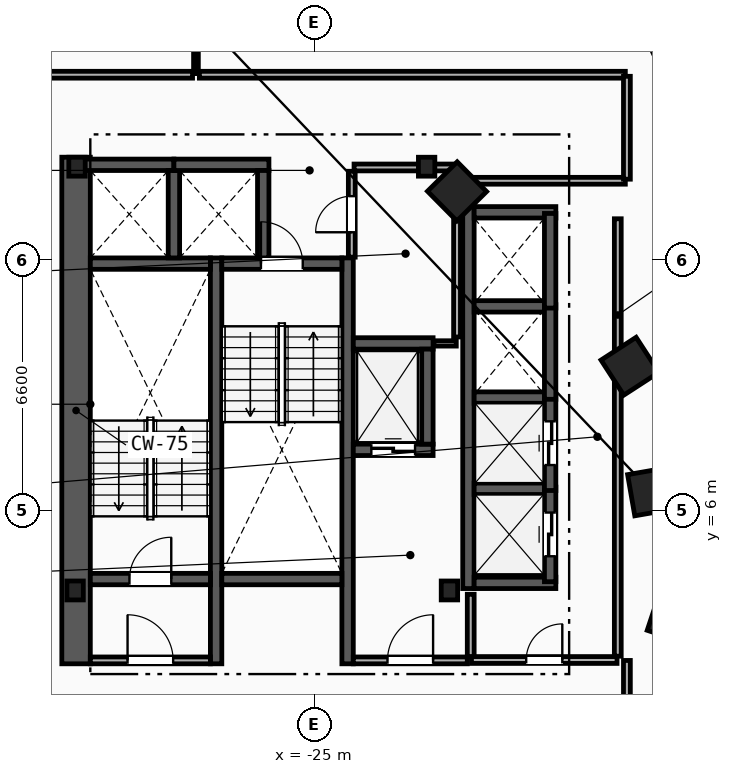
"""IFC4 building model, lengths in metres.
Left out: names, types, materials, properties, quantities, classifications, styles, units other than length and angle.
Written with IfcOpenShell. Run it as: python <this file> out.ifc"""

import sys

from ifc_helpers import new_model, si_unit, direction, frame, frame_2d, origin, origin_2d, place, context, subcontext, project, spatial, rectangle, i_section, extrude, element, fill, save


model = new_model("IFC4")
c1 = context("Model", 3, precision=1e-05, world=origin(), true_north=direction((0.0, 1.0)))
c2 = subcontext(c1, "Body", "Model", "MODEL_VIEW")
j1 = project(units=[si_unit("LENGTHUNIT", "METRE"), si_unit("PLANEANGLEUNIT", "RADIAN")], contexts=[c1])
p1 = place(None, origin())
s1 = spatial("IfcSite", under=j1, at=p1, CompositionType="ELEMENT")
p2 = place(p1, origin())
s2 = spatial("IfcBuilding", under=s1, at=p2, CompositionType="ELEMENT")
p3 = place(p2, frame((0.0, 0.0, 92.6)))
s3 = spatial("IfcBuildingStorey", under=s2, at=p3, CompositionType="ELEMENT", Elevation=92.6)
for number, where, z_axis, x_axis in (
    (1, (-31.3, 3.9, 0.0), (0.0, 0.0, 1.0), (1.0, 0.0, 0.0)),
    (2, (-21.45, 3.9, 0.0), (0.0, 0.0, 1.0), (1.0, 0.0, 0.0)),
    (3, (-22.05, 15.05, 0.0), (0.0, 0.0, 1.0), (1.0, 0.0, 0.0)),
    (4, (-31.25, 15.05, 0.0), (0.0, 0.0, 1.0), (1.0, 0.0, 0.0)),
):
    element("IfcColumn", number, at=place(p3, frame(where, z_axis=z_axis, x_axis=x_axis)), inside=s3, PredefinedType="COLUMN", context=c2, shape_type="SweptSolid", body=[
        extrude(i_section(OverallWidth=0.432, OverallDepth=0.498, WebThickness=0.056, FlangeThickness=0.089, FilletRadius=0.018, at=origin_2d()), origin(), (0.0, 0.0, 1.0), 3.6),
    ])
for number, where, z_axis, x_axis in (
    (5, (-15.55, 3.2, 0.0), (0.0, 0.0, 1.0), (0.315, 0.949, 0.0)),
    (6, (-16.125, 6.5, 0.0), (0.0, 0.0, 1.0), (-0.172, 0.985, 0.0)),
    (7, (-16.7, 9.8, 0.0), (0.0, 0.0, 1.0), (-0.544, 0.839, 0.0)),
    (8, (-21.25, 14.4, 0.0), (0.0, 0.0, 1.0), (-0.703, 0.711, 0.0)),
):
    element("IfcColumn", number, at=place(p3, frame(where, z_axis=z_axis, x_axis=x_axis)), inside=s3, PredefinedType="COLUMN", context=c2, shape_type="SweptSolid", body=[
        extrude(rectangle(XDim=1.1, YDim=1.1, at=origin_2d()), origin(), (0.0, 0.0, 1.0), 3.6),
    ])
p4 = place(p3, frame((-31.275, 1.97, 0.0), z_axis=(0.0, 0.0, 1.0), x_axis=(0.0, 1.0, 0.0)))
e9 = element("IfcWall", 9, at=p4, inside=s3, PredefinedType="SHEAR", context=c2, shape_type="SweptSolid", body=[
    extrude(rectangle(XDim=13.33, YDim=0.75, at=frame_2d((6.665, 0.0))), origin(), (0.0, 0.0, 1.0), 3.3),
])
for number, where, z_axis, x_axis in (
    (10, (-27.59, 1.97, 0.0), (0.0, 0.0, 1.0), (0.0, 1.0, 0.0)),
    (11, (-24.13, 1.97, 0.0), (0.0, 0.0, 1.0), (0.0, 1.0, 0.0)),
):
    element("IfcWall", number, at=place(p3, frame(where, z_axis=z_axis, x_axis=x_axis)), inside=s3, PredefinedType="SHEAR", context=c2, shape_type="SweptSolid", body=[
        extrude(rectangle(XDim=10.68, YDim=0.3, at=frame_2d((5.34, 0.0))), origin(), (0.0, 0.0, 1.0), 3.3),
    ])
p5 = place(p3, frame((-30.9, 4.2, 0.0), z_axis=(0.0, 0.0, 1.0), x_axis=(1.0, 0.0, 0.0)))
e12 = element("IfcWall", 12, at=p5, inside=s3, PredefinedType="SHEAR", context=c2, shape_type="SweptSolid", body=[
    extrude(rectangle(XDim=3.16, YDim=0.3, at=frame_2d((1.58, 0.0))), origin(), (0.0, 0.0, 1.0), 3.3),
])
p6 = place(p5, frame((1.03, 0.0, 0.0)))
e13 = element("IfcOpeningElement", 13, at=p6, cuts=e12, PredefinedType="OPENING", context=c2, shape_type="SweptSolid", body=[
    extrude(rectangle(XDim=1.1, YDim=2.15, at=frame_2d((0.55, 1.075))), frame((0.0, 0.16, 0.0), z_axis=(0.0, -1.0, 0.0), x_axis=(1.0, 0.0, 0.0)), (0.0, 0.0, 1.0), 0.32),
])
p7 = place(p3, frame((-30.9, 12.5, 0.0), z_axis=(0.0, 0.0, 1.0), x_axis=(1.0, 0.0, 0.0)))
e14 = element("IfcWall", 14, at=p7, inside=s3, PredefinedType="SHEAR", context=c2, shape_type="SweptSolid", body=[
    extrude(rectangle(XDim=3.16, YDim=0.3, at=frame_2d((1.58, 0.0))), origin(), (0.0, 0.0, 1.0), 3.3),
])
p8 = place(p3, frame((-27.44, 12.5, 0.0), z_axis=(0.0, 0.0, 1.0), x_axis=(1.0, 0.0, 0.0)))
e15 = element("IfcWall", 15, at=p8, inside=s3, PredefinedType="SHEAR", context=c2, shape_type="SweptSolid", body=[
    extrude(rectangle(XDim=3.16, YDim=0.3, at=frame_2d((1.58, 0.0))), origin(), (0.0, 0.0, 1.0), 3.3),
])
p9 = place(p8, frame((1.03, 0.0, 0.0)))
e16 = element("IfcOpeningElement", 16, at=p9, cuts=e15, PredefinedType="OPENING", context=c2, shape_type="SweptSolid", body=[
    extrude(rectangle(XDim=1.1, YDim=2.15, at=frame_2d((0.55, 1.075))), frame((0.0, 0.16, 0.0), z_axis=(0.0, -1.0, 0.0), x_axis=(1.0, 0.0, 0.0)), (0.0, 0.0, 1.0), 0.32),
])
p10 = place(p3, frame((-27.44, 4.2, 0.0), z_axis=(0.0, 0.0, 1.0), x_axis=(1.0, 0.0, 0.0)))
e17 = element("IfcWall", 17, at=p10, inside=s3, PredefinedType="SHEAR", context=c2, shape_type="SweptSolid", body=[
    extrude(rectangle(XDim=3.16, YDim=0.3, at=frame_2d((1.58, 0.0))), origin(), (0.0, 0.0, 1.0), 3.3),
])
p11 = place(p3, frame((-20.89, 2.15, 0.0), z_axis=(0.0, 0.0, 1.0), x_axis=(0.0, 1.0, 0.0)))
e18 = element("IfcWall", 18, at=p11, inside=s3, PredefinedType="PARTITIONING", context=c2, shape_type="SweptSolid", body=[
    extrude(rectangle(XDim=1.65, YDim=0.18, at=frame_2d((0.825, 0.0))), origin(), (0.0, 0.0, 1.0), 3.3),
])
p12 = place(p3, frame((-23.98, 2.06, 0.0), z_axis=(0.0, 0.0, 1.0), x_axis=(1.0, 0.0, 0.0)))
e19 = element("IfcWall", 19, at=p12, inside=s3, PredefinedType="PARTITIONING", context=c2, shape_type="SweptSolid", body=[
    extrude(rectangle(XDim=3.0, YDim=0.18, at=frame_2d((1.5, 0.0))), origin(), (0.0, 0.0, 1.0), 3.3),
])
p13 = place(p12, frame((0.9, 0.0, 0.0)))
e20 = element("IfcOpeningElement", 20, at=p13, cuts=e19, PredefinedType="OPENING", context=c2, shape_type="SweptSolid", body=[
    extrude(rectangle(XDim=1.2, YDim=2.15, at=frame_2d((0.6, 1.075))), frame((0.0, 0.1, 0.0), z_axis=(0.0, -1.0, 0.0), x_axis=(1.0, 0.0, 0.0)), (0.0, 0.0, 1.0), 0.2),
])
p14 = place(p3, frame((-30.9, 2.06, 0.0), z_axis=(0.0, 0.0, 1.0), x_axis=(1.0, 0.0, 0.0)))
e21 = element("IfcWall", 21, at=p14, inside=s3, PredefinedType="PARTITIONING", context=c2, shape_type="SweptSolid", body=[
    extrude(rectangle(XDim=3.16, YDim=0.18, at=frame_2d((1.58, 0.0))), origin(), (0.0, 0.0, 1.0), 3.3),
])
p15 = place(p14, frame((0.98, 0.0, 0.0)))
e22 = element("IfcOpeningElement", 22, at=p15, cuts=e21, PredefinedType="OPENING", context=c2, shape_type="SweptSolid", body=[
    extrude(rectangle(XDim=1.2, YDim=2.15, at=frame_2d((0.6, 1.075))), frame((0.0, 0.1, 0.0), z_axis=(0.0, -1.0, 0.0), x_axis=(1.0, 0.0, 0.0)), (0.0, 0.0, 1.0), 0.2),
])
p16 = place(p3, frame((-23.98, 7.6, 0.0), z_axis=(0.0, 0.0, 1.0), x_axis=(1.0, 0.0, 0.0)))
e23 = element("IfcWall", 23, at=p16, inside=s3, PredefinedType="SHEAR", context=c2, shape_type="SweptSolid", body=[
    extrude(rectangle(XDim=2.1, YDim=0.3, at=frame_2d((1.05, 0.0))), origin(), (0.0, 0.0, 1.0), 3.3),
])
p17 = place(p16, frame((0.475, 0.0, 0.0)))
e24 = element("IfcOpeningElement", 24, at=p17, cuts=e23, PredefinedType="OPENING", context=c2, shape_type="SweptSolid", body=[
    extrude(rectangle(XDim=1.15, YDim=2.2, at=frame_2d((0.575, 1.1))), frame((0.0, 0.16, 0.0), z_axis=(0.0, -1.0, 0.0), x_axis=(1.0, 0.0, 0.0)), (0.0, 0.0, 1.0), 0.32),
])
p18 = place(p3, frame((-23.98, 10.4, 0.0), z_axis=(0.0, 0.0, 1.0), x_axis=(1.0, 0.0, 0.0)))
e25 = element("IfcWall", 25, at=p18, inside=s3, PredefinedType="SHEAR", context=c2, shape_type="SweptSolid", body=[
    extrude(rectangle(XDim=2.1, YDim=0.3, at=frame_2d((1.05, 0.0))), origin(), (0.0, 0.0, 1.0), 3.3),
])
for number, where, z_axis, x_axis in (
    (26, (-22.03, 7.75, 0.0), (0.0, 0.0, 1.0), (0.0, 1.0, 0.0)),
    (27, (-31.2, 15.1, 0.0), (0.0, 0.0, 1.0), (1.0, 0.0, 0.0)),
):
    element("IfcWall", number, at=place(p3, frame(where, z_axis=z_axis, x_axis=x_axis)), inside=s3, PredefinedType="SHEAR", context=c2, shape_type="SweptSolid", body=[
        extrude(rectangle(XDim=2.5, YDim=0.3, at=frame_2d((1.25, 0.0))), origin(), (0.0, 0.0, 1.0), 3.3),
    ])
p19 = place(p3, frame((-28.7, 12.65, 0.0), z_axis=(0.0, 0.0, 1.0), x_axis=(0.0, 1.0, 0.0)))
e28 = element("IfcWall", 28, at=p19, inside=s3, PredefinedType="SHEAR", context=c2, shape_type="SweptSolid", body=[
    extrude(rectangle(XDim=2.3, YDim=0.3, at=frame_2d((1.15, 0.0))), origin(), (0.0, 0.0, 1.0), 3.3),
])
p20 = place(p3, frame((-28.7, 15.1, 0.0), z_axis=(0.0, 0.0, 1.0), x_axis=(1.0, 0.0, 0.0)))
e29 = element("IfcWall", 29, at=p20, inside=s3, PredefinedType="SHEAR", context=c2, shape_type="SweptSolid", body=[
    extrude(rectangle(XDim=2.5, YDim=0.3, at=frame_2d((1.25, 0.0))), origin(), (0.0, 0.0, 1.0), 3.3),
])
p21 = place(p3, frame((-26.35, 12.65, 0.0), z_axis=(0.0, 0.0, 1.0), x_axis=(0.0, 1.0, 0.0)))
e30 = element("IfcWall", 30, at=p21, inside=s3, PredefinedType="SHEAR", context=c2, shape_type="SweptSolid", body=[
    extrude(rectangle(XDim=2.3, YDim=0.3, at=frame_2d((1.15, 0.0))), origin(), (0.0, 0.0, 1.0), 3.3),
])
p22 = place(p3, frame((-20.95, 3.95, 0.0), z_axis=(0.0, 0.0, 1.0), x_axis=(0.0, 1.0, 0.0)))
e31 = element("IfcWall", 31, at=p22, inside=s3, PredefinedType="SHEAR", context=c2, shape_type="SweptSolid", body=[
    extrude(rectangle(XDim=10.05, YDim=0.3, at=frame_2d((5.025, 0.0))), origin(), (0.0, 0.0, 1.0), 3.3),
])
for number, where, z_axis, x_axis in (
    (32, (-20.8, 4.1, 0.0), (0.0, 0.0, 1.0), (1.0, 0.0, 0.0)),
    (33, (-20.8, 13.85, 0.0), (0.0, 0.0, 1.0), (1.0, 0.0, 0.0)),
):
    element("IfcWall", number, at=place(p3, frame(where, z_axis=z_axis, x_axis=x_axis)), inside=s3, PredefinedType="SHEAR", context=c2, shape_type="SweptSolid", body=[
        extrude(rectangle(XDim=2.15, YDim=0.3, at=frame_2d((1.075, 0.0))), origin(), (0.0, 0.0, 1.0), 3.3),
    ])
for number, where, z_axis, x_axis in (
    (34, (-20.8, 6.575, 0.0), (0.0, 0.0, 1.0), (1.0, 0.0, 0.0)),
    (35, (-20.8, 8.975, 0.0), (0.0, 0.0, 1.0), (1.0, 0.0, 0.0)),
    (36, (-20.8, 11.375, 0.0), (0.0, 0.0, 1.0), (1.0, 0.0, 0.0)),
):
    element("IfcWall", number, at=place(p3, frame(where, z_axis=z_axis, x_axis=x_axis)), inside=s3, PredefinedType="SHEAR", context=c2, shape_type="SweptSolid", body=[
        extrude(rectangle(XDim=1.85, YDim=0.3, at=frame_2d((0.925, 0.0))), origin(), (0.0, 0.0, 1.0), 3.3),
    ])
p23 = place(p3, frame((-18.8, 4.13, 0.0), z_axis=(0.0, 0.0, 1.0), x_axis=(0.0, 1.0, 0.0)))
e37 = element("IfcWall", 37, at=p23, inside=s3, PredefinedType="SHEAR", context=c2, shape_type="SweptSolid", body=[
    extrude(rectangle(XDim=2.49, YDim=0.3, at=frame_2d((1.245, 0.0))), origin(), (0.0, 0.0, 1.0), 3.3),
])
p24 = place(p23, frame((0.67, 0.0, 0.0)))
e38 = element("IfcOpeningElement", 38, at=p24, cuts=e37, PredefinedType="OPENING", context=c2, shape_type="SweptSolid", body=[
    extrude(rectangle(XDim=1.15, YDim=2.2, at=frame_2d((0.575, 1.1))), frame((0.0, 0.16, 0.0), z_axis=(0.0, -1.0, 0.0), x_axis=(1.0, 0.0, 0.0)), (0.0, 0.0, 1.0), 0.32),
])
p25 = place(p3, frame((-18.8, 6.53, 0.0), z_axis=(0.0, 0.0, 1.0), x_axis=(0.0, 1.0, 0.0)))
e39 = element("IfcWall", 39, at=p25, inside=s3, PredefinedType="SHEAR", context=c2, shape_type="SweptSolid", body=[
    extrude(rectangle(XDim=2.49, YDim=0.3, at=frame_2d((1.245, 0.0))), origin(), (0.0, 0.0, 1.0), 3.3),
])
p26 = place(p25, frame((0.67, 0.0, 0.0)))
e40 = element("IfcOpeningElement", 40, at=p26, cuts=e39, PredefinedType="OPENING", context=c2, shape_type="SweptSolid", body=[
    extrude(rectangle(XDim=1.15, YDim=2.2, at=frame_2d((0.575, 1.1))), frame((0.0, 0.16, 0.0), z_axis=(0.0, -1.0, 0.0), x_axis=(1.0, 0.0, 0.0)), (0.0, 0.0, 1.0), 0.32),
])
for number, where, z_axis, x_axis in (
    (41, (-18.8, 8.93, 0.0), (0.0, 0.0, 1.0), (0.0, 1.0, 0.0)),
    (42, (-18.8, 11.33, 0.0), (0.0, 0.0, 1.0), (0.0, 1.0, 0.0)),
):
    element("IfcWall", number, at=place(p3, frame(where, z_axis=z_axis, x_axis=x_axis)), inside=s3, PredefinedType="SHEAR", context=c2, shape_type="SweptSolid", body=[
        extrude(rectangle(XDim=2.49, YDim=0.3, at=frame_2d((1.245, 0.0))), origin(), (0.0, 0.0, 1.0), 3.3),
    ])
p27 = place(p3, frame((-17.02, 2.17, 0.0), z_axis=(0.0, 0.0, 1.0), x_axis=(0.0, 1.0, 0.0)))
e43 = element("IfcWall", 43, at=p27, inside=s3, PredefinedType="PARTITIONING", context=c2, shape_type="SweptSolid", body=[
    extrude(rectangle(XDim=11.51, YDim=0.18, at=frame_2d((5.755, 0.0))), origin(), (0.0, 0.0, 1.0), 3.3),
])
p28 = place(p3, frame((-20.87, 2.07, 0.0), z_axis=(0.0, 0.0, 1.0), x_axis=(1.0, 0.0, 0.0)))
e44 = element("IfcWall", 44, at=p28, inside=s3, PredefinedType="PARTITIONING", context=c2, shape_type="SweptSolid", body=[
    extrude(rectangle(XDim=3.83, YDim=0.18, at=frame_2d((1.915, 0.0))), origin(), (0.0, 0.0, 1.0), 3.3),
])
p29 = place(p28, frame((1.44, 0.0, 0.0)))
e45 = element("IfcOpeningElement", 45, at=p29, cuts=e44, PredefinedType="OPENING", context=c2, shape_type="SweptSolid", body=[
    extrude(rectangle(XDim=0.95, YDim=2.1, at=frame_2d((0.475, 1.05))), frame((0.0, 0.1, 0.0), z_axis=(0.0, -1.0, 0.0), x_axis=(1.0, 0.0, 0.0)), (0.0, 0.0, 1.0), 0.2),
])
p30 = place(p3, frame((-21.86, 10.4, 0.0), z_axis=(0.0, 0.0, 1.0), x_axis=(1.0, 0.0, 0.0)))
e46 = element("IfcWall", 46, at=p30, inside=s3, PredefinedType="PARTITIONING", context=c2, shape_type="SweptSolid", body=[
    extrude(rectangle(XDim=0.59, YDim=0.14, at=frame_2d((0.295, 0.0))), origin(), (0.0, 0.0, 1.0), 3.3),
])
p31 = place(p3, frame((-21.25, 10.57, 0.0), z_axis=(0.0, 0.0, 1.0), x_axis=(0.0, 1.0, 0.0)))
e47 = element("IfcWall", 47, at=p31, inside=s3, PredefinedType="PARTITIONING", context=c2, shape_type="SweptSolid", body=[
    extrude(rectangle(XDim=4.36, YDim=0.18, at=frame_2d((2.18, 0.0))), origin(), (0.0, 0.0, 1.0), 3.3),
])
p32 = place(p3, frame((-23.96, 15.03, 0.0), z_axis=(0.0, 0.0, 1.0), x_axis=(1.0, 0.0, 0.0)))
e48 = element("IfcWall", 48, at=p32, inside=s3, PredefinedType="PARTITIONING", context=c2, shape_type="SweptSolid", body=[
    extrude(rectangle(XDim=2.61, YDim=0.18, at=frame_2d((1.305, 0.0))), origin(), (0.0, 0.0, 1.0), 2.373),
])
p33 = place(p3, frame((-24.02, 12.67, 0.0), z_axis=(0.0, 0.0, 1.0), x_axis=(0.0, 1.0, 0.0)))
e49 = element("IfcWall", 49, at=p33, inside=s3, PredefinedType="PARTITIONING", context=c2, shape_type="SweptSolid", body=[
    extrude(rectangle(XDim=2.26, YDim=0.18, at=frame_2d((1.13, 0.0))), origin(), (0.0, 0.0, 1.0), 3.3),
])
p34 = place(p33, frame((0.655, 0.0, 0.0)))
e50 = element("IfcOpeningElement", 50, at=p34, cuts=e49, PredefinedType="OPENING", context=c2, shape_type="SweptSolid", body=[
    extrude(rectangle(XDim=0.95, YDim=2.1, at=frame_2d((0.475, 1.05))), frame((0.0, 0.1, 0.0), z_axis=(0.0, -1.0, 0.0), x_axis=(1.0, 0.0, 0.0)), (0.0, 0.0, 1.0), 0.2),
])
p35 = place(p3, frame((-28.12, 17.5, 0.0), z_axis=(0.0, 0.0, 1.0), x_axis=(0.0, 1.0, 0.0)))
e51 = element("IfcWall", 51, at=p35, inside=s3, PredefinedType="PARTITIONING", context=c2, shape_type="SweptSolid", body=[
    extrude(rectangle(XDim=8.188, YDim=0.125, at=frame_2d((4.094, 0.0))), origin(), (0.0, 0.0, 1.0), 3.3),
])
p36 = place(p3, frame((-16.822, 17.47, 0.0), z_axis=(0.0, 0.0, 1.0), x_axis=(-1.0, 0.0, 0.0)))
e52 = element("IfcWall", 52, at=p36, inside=s3, PredefinedType="PARTITIONING", context=c2, shape_type="SweptSolid", body=[
    extrude(rectangle(XDim=11.208, YDim=0.18, at=frame_2d((5.604, 0.0))), origin(), (0.0, 0.0, 1.0), 3.3),
])
p37 = place(p3, frame((-21.178, 14.68, 0.0), z_axis=(0.0, 0.0, 1.0), x_axis=(1.0, 0.0, 0.0)))
e53 = element("IfcWall", 53, at=p37, inside=s3, PredefinedType="PARTITIONING", context=c2, shape_type="SweptSolid", body=[
    extrude(rectangle(XDim=4.357, YDim=0.18, at=frame_2d((2.178, 0.0))), origin(), (0.0, 0.0, 1.0), 3.3),
])
p38 = place(p3, frame((-16.78, 14.721, 0.0), z_axis=(0.0, 0.0, 1.0), x_axis=(0.0, 1.0, 0.0)))
e54 = element("IfcWall", 54, at=p38, inside=s3, PredefinedType="PARTITIONING", context=c2, shape_type="SweptSolid", body=[
    extrude(rectangle(XDim=2.707, YDim=0.18, at=frame_2d((1.354, 0.0))), origin(), (0.0, 0.0, 1.0), 3.3),
])
p39 = place(p3, frame((-16.78, -0.329, 0.0), z_axis=(0.0, 0.0, 1.0), x_axis=(0.0, 1.0, 0.0)))
e55 = element("IfcWall", 55, at=p39, inside=s3, PredefinedType="PARTITIONING", context=c2, shape_type="SweptSolid", body=[
    extrude(rectangle(XDim=2.387, YDim=0.18, at=frame_2d((1.194, 0.0))), origin(), (0.0, 0.0, 1.0), 3.3),
])
p40 = place(p3, frame((-28.21, 17.47, 0.0), z_axis=(0.0, 0.0, 1.0), x_axis=(-1.0, 0.0, 0.0)))
e56 = element("IfcWall", 56, at=p40, inside=s3, PredefinedType="PARTITIONING", context=c2, shape_type="SweptSolid", body=[
    extrude(rectangle(XDim=5.418, YDim=0.18, at=frame_2d((2.709, 0.0))), origin(), (0.0, 0.0, 1.0), 3.3),
])
p41 = place(p6, origin())
e57 = element("IfcDoor", 57, at=p41, inside=s3, OperationType="SINGLE_SWING_RIGHT", PredefinedType="DOOR", context=c2, shape_type="SweptSolid", body=[
    extrude(rectangle(XDim=1.1, YDim=2.15, at=frame_2d((0.55, 1.075))), frame((0.0, 0.025, 0.0), z_axis=(0.0, -1.0, 0.0), x_axis=(1.0, 0.0, 0.0)), (0.0, 0.0, 1.0), 0.05),
])
fill(e13, e57)
p42 = place(p9, origin())
e58 = element("IfcDoor", 58, at=p42, inside=s3, OperationType="SINGLE_SWING_LEFT", PredefinedType="DOOR", context=c2, shape_type="SweptSolid", body=[
    extrude(rectangle(XDim=1.1, YDim=2.15, at=frame_2d((0.55, 1.075))), frame((0.0, 0.025, 0.0), z_axis=(0.0, -1.0, 0.0), x_axis=(1.0, 0.0, 0.0)), (0.0, 0.0, 1.0), 0.05),
])
fill(e16, e58)
p43 = place(p13, origin())
e59 = element("IfcDoor", 59, at=p43, inside=s3, OperationType="SINGLE_SWING_RIGHT", PredefinedType="DOOR", context=c2, shape_type="SweptSolid", body=[
    extrude(rectangle(XDim=1.2, YDim=2.15, at=frame_2d((0.6, 1.075))), frame((0.0, 0.025, 0.0), z_axis=(0.0, -1.0, 0.0), x_axis=(1.0, 0.0, 0.0)), (0.0, 0.0, 1.0), 0.05),
])
fill(e20, e59)
p44 = place(p15, origin())
e60 = element("IfcDoor", 60, at=p44, inside=s3, OperationType="SINGLE_SWING_LEFT", PredefinedType="DOOR", context=c2, shape_type="SweptSolid", body=[
    extrude(rectangle(XDim=1.2, YDim=2.15, at=frame_2d((0.6, 1.075))), frame((0.0, 0.025, 0.0), z_axis=(0.0, -1.0, 0.0), x_axis=(1.0, 0.0, 0.0)), (0.0, 0.0, 1.0), 0.05),
])
fill(e22, e60)
p45 = place(p17, origin())
e61 = element("IfcDoor", 61, at=p45, inside=s3, OperationType="SLIDING_TO_LEFT", PredefinedType="TRAPDOOR", context=c2, shape_type="SweptSolid", body=[
    extrude(rectangle(XDim=1.15, YDim=2.2, at=frame_2d((0.575, 1.1))), frame((0.0, 0.025, 0.0), z_axis=(0.0, -1.0, 0.0), x_axis=(1.0, 0.0, 0.0)), (0.0, 0.0, 1.0), 0.05),
])
fill(e24, e61)
p46 = place(p24, origin())
e62 = element("IfcDoor", 62, at=p46, inside=s3, OperationType="SLIDING_TO_LEFT", PredefinedType="TRAPDOOR", context=c2, shape_type="SweptSolid", body=[
    extrude(rectangle(XDim=1.15, YDim=2.2, at=frame_2d((0.575, 1.1))), frame((0.0, 0.025, 0.0), z_axis=(0.0, -1.0, 0.0), x_axis=(1.0, 0.0, 0.0)), (0.0, 0.0, 1.0), 0.05),
])
fill(e38, e62)
p47 = place(p26, origin())
e63 = element("IfcDoor", 63, at=p47, inside=s3, OperationType="SLIDING_TO_LEFT", PredefinedType="TRAPDOOR", context=c2, shape_type="SweptSolid", body=[
    extrude(rectangle(XDim=1.15, YDim=2.2, at=frame_2d((0.575, 1.1))), frame((0.0, 0.025, 0.0), z_axis=(0.0, -1.0, 0.0), x_axis=(1.0, 0.0, 0.0)), (0.0, 0.0, 1.0), 0.05),
])
fill(e40, e63)
p48 = place(p29, origin())
e64 = element("IfcDoor", 64, at=p48, inside=s3, OperationType="SINGLE_SWING_RIGHT", PredefinedType="DOOR", context=c2, shape_type="SweptSolid", body=[
    extrude(rectangle(XDim=0.95, YDim=2.1, at=frame_2d((0.475, 1.05))), frame((0.0, 0.025, 0.0), z_axis=(0.0, -1.0, 0.0), x_axis=(1.0, 0.0, 0.0)), (0.0, 0.0, 1.0), 0.05),
])
fill(e45, e64)
p49 = place(p34, origin())
e65 = element("IfcDoor", 65, at=p49, inside=s3, OperationType="SINGLE_SWING_LEFT", PredefinedType="DOOR", context=c2, shape_type="SweptSolid", body=[
    extrude(rectangle(XDim=0.95, YDim=2.1, at=frame_2d((0.475, 1.05))), frame((0.0, 0.025, 0.0), z_axis=(0.0, -1.0, 0.0), x_axis=(1.0, 0.0, 0.0)), (0.0, 0.0, 1.0), 0.05),
])
fill(e50, e65)
save(model, sys.argv[1])
